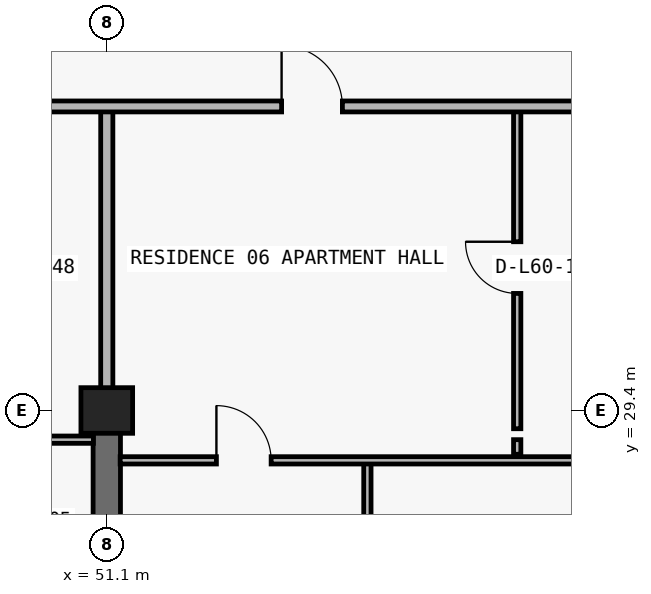
"""IFC4 building model, lengths in metres.
Left out: names, types, materials, properties, quantities, classifications, styles, units other than length and angle.
Written with IfcOpenShell. Run it as: python <this file> out.ifc"""

import sys

from ifc_helpers import new_model, si_unit, direction, frame, frame_2d, origin, origin_2d, place, context, subcontext, project, spatial, rectangle, extrude, element, fill, save


model = new_model("IFC4")
c1 = context("Model", 3, precision=1e-05, world=origin(), true_north=direction((0.0, 1.0)))
c2 = subcontext(c1, "Body", "Model", "MODEL_VIEW")
j1 = project(units=[si_unit("LENGTHUNIT", "METRE"), si_unit("PLANEANGLEUNIT", "RADIAN")], contexts=[c1])
p1 = place(None, origin())
s1 = spatial("IfcSite", under=j1, at=p1, CompositionType="ELEMENT")
p2 = place(p1, origin())
s2 = spatial("IfcBuilding", under=s1, at=p2, CompositionType="ELEMENT")
p3 = place(p2, frame((0.0, 0.0, 214.8)))
s3 = spatial("IfcBuildingStorey", under=s2, at=p3, CompositionType="ELEMENT", Elevation=214.8)
p4 = place(p3, frame((51.1, 29.4, 0.0), z_axis=(0.0, 0.0, 1.0), x_axis=(1.0, 0.0, 0.0)))
e1 = element("IfcColumn", 1, at=p4, inside=s3, PredefinedType="COLUMN", context=c2, shape_type="SweptSolid", body=[
    extrude(rectangle(XDim=0.85, YDim=0.75, at=origin_2d()), origin(), (0.0, 0.0, 1.0), 3.05),
])
p5 = place(p3, frame((51.1, 20.8, 0.0), z_axis=(0.0, 0.0, 1.0), x_axis=(0.0, 1.0, 0.0)))
e2 = element("IfcWall", 2, at=p5, inside=s3, PredefinedType="SHEAR", context=c2, shape_type="SweptSolid", body=[
    extrude(rectangle(XDim=8.6, YDim=0.45, at=frame_2d((4.3, 0.0))), origin(), (0.0, 0.0, 1.0), 3.05),
])
p6 = place(p3, frame((51.1, 29.405, 0.0), z_axis=(0.0, 0.0, 1.0), x_axis=(0.0, 1.0, 0.0)))
e3 = element("IfcWall", 3, at=p6, inside=s3, PredefinedType="PARTITIONING", context=c2, shape_type="SweptSolid", body=[
    extrude(rectangle(XDim=4.995, YDim=0.2, at=frame_2d((2.498, 0.0))), origin(), (0.0, 0.0, 1.0), 2.335),
])
p7 = place(p3, frame((55.386, 23.89, 0.0), z_axis=(0.0, 0.0, 1.0), x_axis=(0.0, 1.0, 0.0)))
e4 = element("IfcWall", 4, at=p7, inside=s3, PredefinedType="PARTITIONING", context=c2, shape_type="SweptSolid", body=[
    extrude(rectangle(XDim=4.69, YDim=0.12, at=frame_2d((2.345, 0.0))), origin(), (0.0, 0.0, 1.0), 3.05),
])
p8 = place(p7, frame((1.895, 0.0, 0.0)))
e5 = element("IfcOpeningElement", 5, at=p8, cuts=e4, PredefinedType="OPENING", context=c2, shape_type="SweptSolid", body=[
    extrude(rectangle(XDim=0.9, YDim=2.15, at=frame_2d((0.45, 1.075))), frame((0.0, 0.07, 0.0), z_axis=(0.0, -1.0, 0.0), x_axis=(1.0, 0.0, 0.0)), (0.0, 0.0, 1.0), 0.14),
])
p9 = place(p3, frame((57.85, 28.68, 0.0), z_axis=(0.0, 0.0, 1.0), x_axis=(0.0, 1.0, 0.0)))
e6 = element("IfcWall", 6, at=p9, inside=s3, PredefinedType="PARTITIONING", context=c2, shape_type="SweptSolid", body=[
    extrude(rectangle(XDim=0.24, YDim=0.12, at=frame_2d((0.12, 0.0))), origin(), (0.0, 0.0, 1.0), 3.05),
])
p10 = place(p3, frame((57.85, 29.1, 0.0), z_axis=(0.0, 0.0, 1.0), x_axis=(0.0, 1.0, 0.0)))
e7 = element("IfcWall", 7, at=p10, inside=s3, PredefinedType="PARTITIONING", context=c2, shape_type="SweptSolid", body=[
    extrude(rectangle(XDim=5.3, YDim=0.12, at=frame_2d((2.65, 0.0))), origin(), (0.0, 0.0, 1.0), 3.05),
])
p11 = place(p10, frame((2.225, 0.0, 0.0)))
e8 = element("IfcOpeningElement", 8, at=p11, cuts=e7, PredefinedType="OPENING", context=c2, shape_type="SweptSolid", body=[
    extrude(rectangle(XDim=0.85, YDim=2.1, at=frame_2d((0.425, 1.05))), frame((0.0, 0.07, 0.0), z_axis=(0.0, -1.0, 0.0), x_axis=(1.0, 0.0, 0.0)), (0.0, 0.0, 1.0), 0.14),
])
p12 = place(p3, frame((51.32, 28.58, 0.0), z_axis=(0.0, 0.0, 1.0), x_axis=(1.0, 0.0, 0.0)))
e9 = element("IfcWall", 9, at=p12, inside=s3, PredefinedType="PARTITIONING", context=c2, shape_type="SweptSolid", body=[
    extrude(rectangle(XDim=8.18, YDim=0.12, at=frame_2d((4.09, 0.0))), origin(), (0.0, 0.0, 1.0), 3.05),
])
p13 = place(p12, frame((1.583, 0.0, 0.0)))
e10 = element("IfcOpeningElement", 10, at=p13, cuts=e9, PredefinedType="OPENING", context=c2, shape_type="SweptSolid", body=[
    extrude(rectangle(XDim=0.9, YDim=2.15, at=frame_2d((0.45, 1.075))), frame((0.0, 0.07, 0.0), z_axis=(0.0, -1.0, 0.0), x_axis=(1.0, 0.0, 0.0)), (0.0, 0.0, 1.0), 0.14),
])
p14 = place(p3, frame((42.7, 28.92, 0.0), z_axis=(0.0, 0.0, 1.0), x_axis=(1.0, 0.0, 0.0)))
e11 = element("IfcWall", 11, at=p14, inside=s3, PredefinedType="PARTITIONING", context=c2, shape_type="SweptSolid", body=[
    extrude(rectangle(XDim=8.18, YDim=0.12, at=frame_2d((4.09, 0.0))), origin(), (0.0, 0.0, 1.0), 3.05),
])
p15 = place(p14, frame((1.943, 0.0, 0.0)))
e12 = element("IfcOpeningElement", 12, at=p15, cuts=e11, PredefinedType="OPENING", context=c2, shape_type="SweptSolid", body=[
    extrude(rectangle(XDim=0.9, YDim=2.15, at=frame_2d((0.45, 1.075))), frame((0.0, 0.07, 0.0), z_axis=(0.0, -1.0, 0.0), x_axis=(1.0, 0.0, 0.0)), (0.0, 0.0, 1.0), 0.14),
])
p16 = place(p3, frame((39.28, 34.4, 0.0), z_axis=(0.0, 0.0, 1.0), x_axis=(1.0, 0.0, 0.0)))
e13 = element("IfcWall", 13, at=p16, inside=s3, PredefinedType="PARTITIONING", context=c2, shape_type="SweptSolid", body=[
    extrude(rectangle(XDim=28.42, YDim=0.18, at=frame_2d((14.21, 0.0))), origin(), (0.0, 0.0, 1.0), 3.05),
])
p17 = place(p16, frame((6.18, 0.0, 0.0)))
e14 = element("IfcOpeningElement", 14, at=p17, cuts=e13, PredefinedType="OPENING", context=c2, shape_type="SweptSolid", body=[
    extrude(rectangle(XDim=1.0, YDim=2.2, at=frame_2d((0.5, 1.1))), frame((0.0, 0.1, 0.0), z_axis=(0.0, -1.0, 0.0), x_axis=(1.0, 0.0, 0.0)), (0.0, 0.0, 1.0), 0.2),
])
p18 = place(p16, frame((14.695, 0.0, 0.0)))
e15 = element("IfcOpeningElement", 15, at=p18, cuts=e13, PredefinedType="OPENING", context=c2, shape_type="SweptSolid", body=[
    extrude(rectangle(XDim=1.0, YDim=2.2, at=frame_2d((0.5, 1.1))), frame((0.0, 0.1, 0.0), z_axis=(0.0, -1.0, 0.0), x_axis=(1.0, 0.0, 0.0)), (0.0, 0.0, 1.0), 0.2),
])
p19 = place(p16, frame((22.87, 0.0, 0.0)))
e16 = element("IfcOpeningElement", 16, at=p19, cuts=e13, PredefinedType="OPENING", context=c2, shape_type="SweptSolid", body=[
    extrude(rectangle(XDim=1.0, YDim=2.2, at=frame_2d((0.5, 1.1))), frame((0.0, 0.1, 0.0), z_axis=(0.0, -1.0, 0.0), x_axis=(1.0, 0.0, 0.0)), (0.0, 0.0, 1.0), 0.2),
])
p20 = place(p18, origin())
e17 = element("IfcDoor", 17, at=p20, inside=s3, OperationType="SINGLE_SWING_LEFT", PredefinedType="DOOR", context=c2, shape_type="SweptSolid", body=[
    extrude(rectangle(XDim=1.0, YDim=2.2, at=frame_2d((0.5, 1.1))), frame((0.0, 0.025, 0.0), z_axis=(0.0, -1.0, 0.0), x_axis=(1.0, 0.0, 0.0)), (0.0, 0.0, 1.0), 0.05),
])
fill(e15, e17)
p21 = place(p11, origin())
e18 = element("IfcDoor", 18, at=p21, inside=s3, OperationType="SINGLE_SWING_RIGHT", PredefinedType="DOOR", context=c2, shape_type="SweptSolid", body=[
    extrude(rectangle(XDim=0.85, YDim=2.1, at=frame_2d((0.425, 1.05))), frame((0.0, 0.025, 0.0), z_axis=(0.0, -1.0, 0.0), x_axis=(1.0, 0.0, 0.0)), (0.0, 0.0, 1.0), 0.05),
])
fill(e8, e18)
p22 = place(p13, origin())
e19 = element("IfcDoor", 19, at=p22, inside=s3, OperationType="SINGLE_SWING_LEFT", PredefinedType="DOOR", context=c2, shape_type="SweptSolid", body=[
    extrude(rectangle(XDim=0.9, YDim=2.15, at=frame_2d((0.45, 1.075))), frame((0.0, 0.025, 0.0), z_axis=(0.0, -1.0, 0.0), x_axis=(1.0, 0.0, 0.0)), (0.0, 0.0, 1.0), 0.05),
])
fill(e10, e19)
save(model, sys.argv[1])
